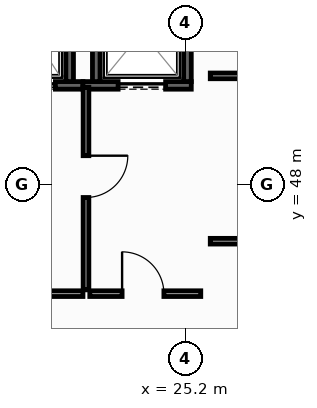
"""IFC4 building model, lengths in metres.
Left out: names, types, materials, properties, quantities, classifications, styles, units other than length and angle.
Written with IfcOpenShell. Run it as: python <this file> out.ifc"""

import sys

from ifc_helpers import new_model, si_unit, direction, frame, frame_2d, origin, place, context, subcontext, project, spatial, rectangle, extrude, element, fill, save


model = new_model("IFC4")
c1 = context("Model", 3, precision=1e-05, world=origin(), true_north=direction((0.0, 1.0)))
c2 = subcontext(c1, "Body", "Model", "MODEL_VIEW")
j1 = project(units=[si_unit("LENGTHUNIT", "METRE"), si_unit("PLANEANGLEUNIT", "RADIAN")], contexts=[c1])
p1 = place(None, origin())
s1 = spatial("IfcSite", under=j1, at=p1, CompositionType="ELEMENT")
p2 = place(p1, origin())
s2 = spatial("IfcBuilding", under=s1, at=p2, CompositionType="ELEMENT")
p3 = place(p2, frame((0.0, 0.0, 268.6)))
s3 = spatial("IfcBuildingStorey", under=s2, at=p3, CompositionType="ELEMENT", Elevation=268.6)
p4 = place(p3, frame((19.85, 50.6, 0.0), z_axis=(0.0, 0.0, 1.0), x_axis=(1.0, 0.0, 0.0)))
e1 = element("IfcWall", 1, at=p4, inside=s3, PredefinedType="SHEAR", context=c2, shape_type="SweptSolid", body=[
    extrude(rectangle(XDim=2.65, YDim=0.2, at=frame_2d((1.325, 0.0))), origin(), (0.0, 0.0, 1.0), 3.55),
])
p5 = place(p4, frame((0.675, 0.0, 0.0)))
e2 = element("IfcOpeningElement", 2, at=p5, cuts=e1, PredefinedType="OPENING", context=c2, shape_type="SweptSolid", body=[
    extrude(rectangle(XDim=1.25, YDim=2.3, at=frame_2d((0.625, 1.15))), frame((0.0, 0.11, 0.0), z_axis=(0.0, -1.0, 0.0), x_axis=(1.0, 0.0, 0.0)), (0.0, 0.0, 1.0), 0.22),
])
p6 = place(p3, frame((22.15, 50.7, 0.0), z_axis=(0.0, 0.0, 1.0), x_axis=(0.0, 1.0, 0.0)))
e3 = element("IfcWall", 3, at=p6, inside=s3, PredefinedType="SHEAR", context=c2, shape_type="SweptSolid", body=[
    extrude(rectangle(XDim=2.6, YDim=0.2, at=frame_2d((1.3, 0.0))), origin(), (0.0, 0.0, 1.0), 3.55),
])
p7 = place(p3, frame((22.5, 50.6, 0.0), z_axis=(0.0, 0.0, 1.0), x_axis=(1.0, 0.0, 0.0)))
e4 = element("IfcWall", 4, at=p7, inside=s3, PredefinedType="SHEAR", context=c2, shape_type="SweptSolid", body=[
    extrude(rectangle(XDim=2.85, YDim=0.2, at=frame_2d((1.425, 0.0))), origin(), (0.0, 0.0, 1.0), 3.55),
])
p8 = place(p7, frame((0.925, 0.0, 0.0)))
e5 = element("IfcOpeningElement", 5, at=p8, cuts=e4, PredefinedType="OPENING", context=c2, shape_type="SweptSolid", body=[
    extrude(rectangle(XDim=1.25, YDim=2.3, at=frame_2d((0.625, 1.15))), frame((0.0, 0.11, 0.0), z_axis=(0.0, -1.0, 0.0), x_axis=(1.0, 0.0, 0.0)), (0.0, 0.0, 1.0), 0.22),
])
for number, where, z_axis, x_axis in (
    (6, (22.85, 50.7, 0.0), (0.0, 0.0, 1.0), (0.0, 1.0, 0.0)),
    (7, (25.25, 50.7, 0.0), (0.0, 0.0, 1.0), (0.0, 1.0, 0.0)),
):
    element("IfcWall", number, at=place(p3, frame(where, z_axis=z_axis, x_axis=x_axis)), inside=s3, PredefinedType="SHEAR", context=c2, shape_type="SweptSolid", body=[
        extrude(rectangle(XDim=2.6, YDim=0.2, at=frame_2d((1.3, 0.0))), origin(), (0.0, 0.0, 1.0), 3.55),
    ])
p9 = place(p3, frame((17.36, 45.12, 0.0), z_axis=(0.0, 0.0, 1.0), x_axis=(1.0, 0.0, 0.0)))
e8 = element("IfcWall", 8, at=p9, inside=s3, PredefinedType="PARTITIONING", context=c2, shape_type="SweptSolid", body=[
    extrude(rectangle(XDim=5.14, YDim=0.15, at=frame_2d((2.57, 0.0))), origin(), (0.0, 0.0, 1.0), 3.55),
])
p10 = place(p9, frame((1.8, 0.0, 0.0)))
e9 = element("IfcOpeningElement", 9, at=p10, cuts=e8, PredefinedType="OPENING", context=c2, shape_type="SweptSolid", body=[
    extrude(rectangle(XDim=1.1, YDim=2.15, at=frame_2d((0.55, 1.075))), frame((0.0, 0.085, 0.0), z_axis=(0.0, -1.0, 0.0), x_axis=(1.0, 0.0, 0.0)), (0.0, 0.0, 1.0), 0.17),
])
p11 = place(p3, frame((22.58, 50.55, 0.0), z_axis=(0.0, 0.0, 1.0), x_axis=(0.0, -1.0, 0.0)))
e10 = element("IfcWall", 10, at=p11, inside=s3, PredefinedType="PARTITIONING", context=c2, shape_type="SweptSolid", body=[
    extrude(rectangle(XDim=5.33, YDim=0.15, at=frame_2d((2.665, 0.0))), origin(), (0.0, 0.0, 1.0), 3.55),
])
p12 = place(p11, frame((1.8, 0.0, 0.0)))
e11 = element("IfcOpeningElement", 11, at=p12, cuts=e10, PredefinedType="OPENING", context=c2, shape_type="SweptSolid", body=[
    extrude(rectangle(XDim=1.1, YDim=2.15, at=frame_2d((0.55, 1.075))), frame((0.0, 0.085, 0.0), z_axis=(0.0, -1.0, 0.0), x_axis=(1.0, 0.0, 0.0)), (0.0, 0.0, 1.0), 0.17),
])
p13 = place(p3, frame((22.68, 45.12, 0.0), z_axis=(0.0, 0.0, 1.0), x_axis=(1.0, 0.0, 0.0)))
e12 = element("IfcWall", 12, at=p13, inside=s3, PredefinedType="PARTITIONING", context=c2, shape_type="SweptSolid", body=[
    extrude(rectangle(XDim=2.92, YDim=0.15, at=frame_2d((1.46, 0.0))), origin(), (0.0, 0.0, 1.0), 3.55),
])
p14 = place(p13, frame((0.85, 0.0, 0.0)))
e13 = element("IfcOpeningElement", 13, at=p14, cuts=e12, PredefinedType="OPENING", context=c2, shape_type="SweptSolid", body=[
    extrude(rectangle(XDim=1.1, YDim=2.15, at=frame_2d((0.55, 1.075))), frame((0.0, 0.085, 0.0), z_axis=(0.0, -1.0, 0.0), x_axis=(1.0, 0.0, 0.0)), (0.0, 0.0, 1.0), 0.17),
])
p15 = place(p3, frame((25.85, 50.85, 0.0), z_axis=(0.0, 0.0, 1.0), x_axis=(1.0, 0.0, 0.0)))
e14 = element("IfcWall", 14, at=p15, inside=s3, PredefinedType="PARTITIONING", context=c2, shape_type="SweptSolid", body=[
    extrude(rectangle(XDim=7.65, YDim=0.15, at=frame_2d((3.825, 0.0))), origin(), (0.0, 0.0, 1.0), 3.55),
])
p16 = place(p15, frame((1.25, 0.0, 0.0)))
e15 = element("IfcOpeningElement", 15, at=p16, cuts=e14, PredefinedType="OPENING", context=c2, shape_type="SweptSolid", body=[
    extrude(rectangle(XDim=0.95, YDim=2.15, at=frame_2d((0.475, 1.075))), frame((0.0, 0.085, 0.0), z_axis=(0.0, -1.0, 0.0), x_axis=(1.0, 0.0, 0.0)), (0.0, 0.0, 1.0), 0.17),
])
p17 = place(p3, frame((25.85, 46.5, 0.0), z_axis=(0.0, 0.0, 1.0), x_axis=(1.0, 0.0, 0.0)))
e16 = element("IfcWall", 16, at=p17, inside=s3, PredefinedType="PARTITIONING", context=c2, shape_type="SweptSolid", body=[
    extrude(rectangle(XDim=7.65, YDim=0.15, at=frame_2d((3.825, 0.0))), origin(), (0.0, 0.0, 1.0), 3.55),
])
p18 = place(p17, frame((2.8, 0.0, 0.0)))
e17 = element("IfcOpeningElement", 17, at=p18, cuts=e16, PredefinedType="OPENING", context=c2, shape_type="SweptSolid", body=[
    extrude(rectangle(XDim=0.95, YDim=2.15, at=frame_2d((0.475, 1.075))), frame((0.0, 0.085, 0.0), z_axis=(0.0, -1.0, 0.0), x_axis=(1.0, 0.0, 0.0)), (0.0, 0.0, 1.0), 0.17),
])
p19 = place(p5, origin())
e18 = element("IfcDoor", 18, at=p19, inside=s3, OperationType="SLIDING_TO_LEFT", PredefinedType="DOOR", context=c2, shape_type="SweptSolid", body=[
    extrude(rectangle(XDim=1.25, YDim=2.3, at=frame_2d((0.625, 1.15))), frame((0.0, 0.025, 0.0), z_axis=(0.0, -1.0, 0.0), x_axis=(1.0, 0.0, 0.0)), (0.0, 0.0, 1.0), 0.05),
])
fill(e2, e18)
p20 = place(p8, origin())
e19 = element("IfcDoor", 19, at=p20, inside=s3, OperationType="SLIDING_TO_LEFT", PredefinedType="DOOR", context=c2, shape_type="SweptSolid", body=[
    extrude(rectangle(XDim=1.25, YDim=2.3, at=frame_2d((0.625, 1.15))), frame((0.0, 0.025, 0.0), z_axis=(0.0, -1.0, 0.0), x_axis=(1.0, 0.0, 0.0)), (0.0, 0.0, 1.0), 0.05),
])
fill(e5, e19)
p21 = place(p12, origin())
e20 = element("IfcDoor", 20, at=p21, inside=s3, OperationType="SINGLE_SWING_LEFT", PredefinedType="DOOR", context=c2, shape_type="SweptSolid", body=[
    extrude(rectangle(XDim=1.1, YDim=2.15, at=frame_2d((0.55, 1.075))), frame((0.0, 0.025, 0.0), z_axis=(0.0, -1.0, 0.0), x_axis=(1.0, 0.0, 0.0)), (0.0, 0.0, 1.0), 0.05),
])
fill(e11, e20)
p22 = place(p14, origin())
e21 = element("IfcDoor", 21, at=p22, inside=s3, OperationType="SINGLE_SWING_LEFT", PredefinedType="DOOR", context=c2, shape_type="SweptSolid", body=[
    extrude(rectangle(XDim=1.1, YDim=2.15, at=frame_2d((0.55, 1.075))), frame((0.0, 0.025, 0.0), z_axis=(0.0, -1.0, 0.0), x_axis=(1.0, 0.0, 0.0)), (0.0, 0.0, 1.0), 0.05),
])
fill(e13, e21)
save(model, sys.argv[1])
